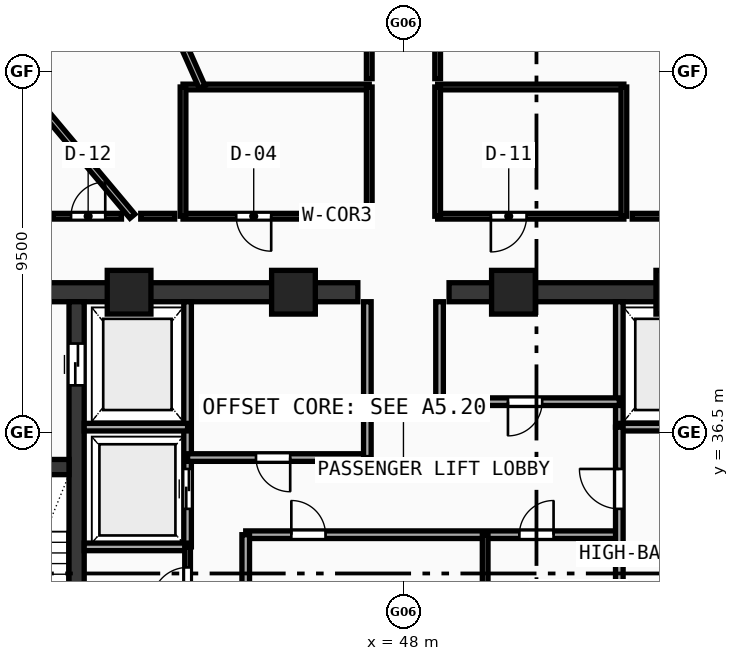
"""IFC4 building model, lengths in metres.
Left out: names, types, materials, properties, quantities, classifications, styles, units other than length and angle.
Written with IfcOpenShell. Run it as: python <this file> out.ifc"""

import sys

from ifc_helpers import new_model, si_unit, direction, frame, frame_2d, origin, origin_with_axes, origin_2d, place, context, subcontext, project, spatial, rectangle, hollow_rectangle, extrude, source, transform, mapped, element, fill, save


model = new_model("IFC4")
c1 = context("Model", 3, precision=1e-05, world=origin(), true_north=direction((0.0, 1.0)))
c2 = subcontext(c1, "Body", "Model", "MODEL_VIEW")
j1 = project(units=[si_unit("LENGTHUNIT", "METRE"), si_unit("PLANEANGLEUNIT", "RADIAN")], contexts=[c1])
p1 = place(None, origin())
s1 = spatial("IfcSite", under=j1, at=p1, CompositionType="ELEMENT")
p2 = place(p1, origin())
s2 = spatial("IfcBuilding", under=s1, at=p2, CompositionType="ELEMENT")
p3 = place(p2, frame((0.0, 0.0, 325.51)))
s3 = spatial("IfcBuildingStorey", under=s2, at=p3, CompositionType="ELEMENT", Elevation=325.51)
p4 = place(p3, frame((35.55, 40.2, 0.0), z_axis=(0.0, 0.0, 1.0), x_axis=(1.0, 0.0, 0.0)))
e1 = element("IfcWall", 1, at=p4, inside=s3, PredefinedType="SHEAR", context=c2, shape_type="SweptSolid", body=[
    extrude(rectangle(XDim=11.25, YDim=0.5, at=frame_2d((5.625, 0.0))), origin(), (0.0, 0.0, 1.0), 3.49),
])
p5 = place(p4, frame((1.6, 0.0, 0.0)))
e2 = element("IfcOpeningElement", 2, at=p5, cuts=e1, PredefinedType="OPENING", context=c2, shape_type="SweptSolid", body=[
    extrude(rectangle(XDim=1.05, YDim=2.1, at=frame_2d((0.525, 1.05))), frame((0.0, 0.26, 0.0), z_axis=(0.0, -1.0, 0.0), x_axis=(1.0, 0.0, 0.0)), (0.0, 0.0, 1.0), 0.52),
])
p6 = place(p3, frame((49.2, 40.2, 0.0), z_axis=(0.0, 0.0, 1.0), x_axis=(1.0, 0.0, 0.0)))
e3 = element("IfcWall", 3, at=p6, inside=s3, PredefinedType="SHEAR", context=c2, shape_type="SweptSolid", body=[
    extrude(rectangle(XDim=11.25, YDim=0.5, at=frame_2d((5.625, 0.0))), origin(), (0.0, 0.0, 1.0), 3.49),
])
p7 = place(p6, frame((8.6, 0.0, 0.0)))
e4 = element("IfcOpeningElement", 4, at=p7, cuts=e3, PredefinedType="OPENING", context=c2, shape_type="SweptSolid", body=[
    extrude(rectangle(XDim=1.05, YDim=2.1, at=frame_2d((0.525, 1.05))), frame((0.0, 0.26, 0.0), z_axis=(0.0, -1.0, 0.0), x_axis=(1.0, 0.0, 0.0)), (0.0, 0.0, 1.0), 0.52),
])
p8 = place(p3, frame((39.4, 27.75, 0.0), z_axis=(0.0, 0.0, 1.0), x_axis=(0.0, 1.0, 0.0)))
e5 = element("IfcWall", 5, at=p8, inside=s3, PredefinedType="SHEAR", context=c2, shape_type="SweptSolid", body=[
    extrude(rectangle(XDim=12.2, YDim=0.4, at=frame_2d((6.1, 0.0))), origin(), (0.0, 0.0, 1.0), 3.49),
])
p9 = place(p8, frame((10.0, 0.0, 0.0)))
e6 = element("IfcOpeningElement", 6, at=p9, cuts=e5, PredefinedType="OPENING", context=c2, shape_type="SweptSolid", body=[
    extrude(rectangle(XDim=1.1, YDim=2.1, at=frame_2d((0.55, 1.05))), frame((0.0, 0.21, 0.0), z_axis=(0.0, -1.0, 0.0), x_axis=(1.0, 0.0, 0.0)), (0.0, 0.0, 1.0), 0.42),
])
p10 = place(p3, frame((36.05, 35.6, 0.0), z_axis=(0.0, 0.0, 1.0), x_axis=(1.0, 0.0, 0.0)))
e7 = element("IfcWall", 7, at=p10, inside=s3, PredefinedType="SHEAR", context=c2, shape_type="SweptSolid", body=[
    extrude(rectangle(XDim=3.15, YDim=0.4, at=frame_2d((1.575, 0.0))), origin(), (0.0, 0.0, 1.0), 3.49),
])
p11 = place(p10, frame((1.07, 0.0, 0.0)))
e8 = element("IfcOpeningElement", 8, at=p11, cuts=e7, PredefinedType="OPENING", context=c2, shape_type="SweptSolid", body=[
    extrude(rectangle(XDim=1.05, YDim=2.1, at=frame_2d((0.525, 1.05))), frame((0.0, 0.21, 0.0), z_axis=(0.0, -1.0, 0.0), x_axis=(1.0, 0.0, 0.0)), (0.0, 0.0, 1.0), 0.42),
])
m1 = source(origin(), c2, "Body", "SweptSolid", [
    extrude(hollow_rectangle(XDim=1.15, YDim=1.15, WallThickness=0.048, at=origin_2d()), origin(), (0.0, 0.0, 1.0), 3.75),
])
for number, where, z_axis, x_axis in (
    (9, (55.219, 40.2, -0.26), (0.0, 0.0, 1.0), (1.0, 0.0, 0.0)),
    (10, (50.894, 40.2, -0.26), (0.0, 0.0, 1.0), (1.0, 0.0, 0.0)),
    (11, (45.106, 40.2, -0.26), (0.0, 0.0, 1.0), (1.0, 0.0, 0.0)),
    (12, (40.781, 40.2, -0.26), (0.0, 0.0, 1.0), (1.0, 0.0, 0.0)),
):
    element("IfcColumn", number, at=place(p3, frame(where, z_axis=z_axis, x_axis=x_axis)), inside=s3, PredefinedType="COLUMN", context=c2, shape_type="MappedRepresentation", body=[
        mapped(m1, transform((0.0, 0.0, 0.0), scale=1.0)),
    ])
p12 = place(p3, frame((42.32, 33.5, 0.0), z_axis=(0.0, 0.0, 1.0), x_axis=(0.0, 1.0, 0.0)))
e13 = element("IfcWall", 13, at=p12, inside=s3, PredefinedType="SOLIDWALL", context=c2, shape_type="SweptSolid", body=[
    extrude(rectangle(XDim=6.45, YDim=0.2, at=frame_2d((3.225, 0.0))), origin(), (0.0, 0.0, 1.0), 3.49),
])
p13 = place(p12, frame((1.0, 0.0, 0.0)))
e14 = element("IfcOpeningElement", 14, at=p13, cuts=e13, PredefinedType="OPENING", context=c2, shape_type="SweptSolid", body=[
    extrude(rectangle(XDim=1.05, YDim=2.1, at=frame_2d((0.525, 1.05))), frame((0.0, 0.11, 0.0), z_axis=(0.0, -1.0, 0.0), x_axis=(1.0, 0.0, 0.0)), (0.0, 0.0, 1.0), 0.22),
])
for number, where, z_axis, x_axis in (
    (15, (39.6, 36.65, 0.0), (0.0, 0.0, 1.0), (1.0, 0.0, 0.0)),
    (16, (39.6, 33.5, 0.0), (0.0, 0.0, 1.0), (1.0, 0.0, 0.0)),
):
    element("IfcWall", number, at=place(p3, frame(where, z_axis=z_axis, x_axis=x_axis)), inside=s3, PredefinedType="SOLIDWALL", context=c2, shape_type="SweptSolid", body=[
        extrude(rectangle(XDim=2.72, YDim=0.2, at=frame_2d((1.36, 0.0))), origin(), (0.0, 0.0, 1.0), 3.49),
    ])
p14 = place(p3, frame((53.68, 36.65, 0.0), z_axis=(0.0, 0.0, 1.0), x_axis=(0.0, 1.0, 0.0)))
e17 = element("IfcWall", 17, at=p14, inside=s3, PredefinedType="SOLIDWALL", context=c2, shape_type="SweptSolid", body=[
    extrude(rectangle(XDim=3.3, YDim=0.2, at=frame_2d((1.65, 0.0))), origin(), (0.0, 0.0, 1.0), 3.49),
])
p15 = place(p3, frame((53.68, 36.65, 0.0), z_axis=(0.0, 0.0, 1.0), x_axis=(1.0, 0.0, 0.0)))
e18 = element("IfcWall", 18, at=p15, inside=s3, PredefinedType="SOLIDWALL", context=c2, shape_type="SweptSolid", body=[
    extrude(rectangle(XDim=2.72, YDim=0.2, at=frame_2d((1.36, 0.0))), origin(), (0.0, 0.0, 1.0), 3.49),
])
p16 = place(p3, frame((42.32, 35.85, 0.0), z_axis=(0.0, 0.0, 1.0), x_axis=(1.0, 0.0, 0.0)))
e19 = element("IfcWall", 19, at=p16, inside=s3, PredefinedType="SOLIDWALL", context=c2, shape_type="SweptSolid", body=[
    extrude(rectangle(XDim=4.73, YDim=0.2, at=frame_2d((2.365, 0.0))), origin(), (0.0, 0.0, 1.0), 3.49),
])
p17 = place(p16, frame((1.8, 0.0, 0.0)))
e20 = element("IfcOpeningElement", 20, at=p17, cuts=e19, PredefinedType="OPENING", context=c2, shape_type="SweptSolid", body=[
    extrude(rectangle(XDim=0.9, YDim=2.1, at=frame_2d((0.45, 1.05))), frame((0.0, 0.11, 0.0), z_axis=(0.0, -1.0, 0.0), x_axis=(1.0, 0.0, 0.0)), (0.0, 0.0, 1.0), 0.22),
])
p18 = place(p3, frame((48.95, 37.32, 0.0), z_axis=(0.0, 0.0, 1.0), x_axis=(1.0, 0.0, 0.0)))
e21 = element("IfcWall", 21, at=p18, inside=s3, PredefinedType="SOLIDWALL", context=c2, shape_type="SweptSolid", body=[
    extrude(rectangle(XDim=4.73, YDim=0.2, at=frame_2d((2.365, 0.0))), origin(), (0.0, 0.0, 1.0), 3.49),
])
p19 = place(p18, frame((1.8, 0.0, 0.0)))
e22 = element("IfcOpeningElement", 22, at=p19, cuts=e21, PredefinedType="OPENING", context=c2, shape_type="SweptSolid", body=[
    extrude(rectangle(XDim=0.9, YDim=2.1, at=frame_2d((0.45, 1.05))), frame((0.0, 0.11, 0.0), z_axis=(0.0, -1.0, 0.0), x_axis=(1.0, 0.0, 0.0)), (0.0, 0.0, 1.0), 0.22),
])
p20 = place(p3, frame((47.05, 35.85, 0.0), z_axis=(0.0, 0.0, 1.0), x_axis=(0.0, 1.0, 0.0)))
e23 = element("IfcWall", 23, at=p20, inside=s3, PredefinedType="SOLIDWALL", context=c2, shape_type="SweptSolid", body=[
    extrude(rectangle(XDim=4.1, YDim=0.2, at=frame_2d((2.05, 0.0))), origin(), (0.0, 0.0, 1.0), 3.49),
])
p21 = place(p3, frame((48.95, 37.32, 0.0), z_axis=(0.0, 0.0, 1.0), x_axis=(0.0, 1.0, 0.0)))
e24 = element("IfcWall", 24, at=p21, inside=s3, PredefinedType="SOLIDWALL", context=c2, shape_type="SweptSolid", body=[
    extrude(rectangle(XDim=2.63, YDim=0.2, at=frame_2d((1.315, 0.0))), origin(), (0.0, 0.0, 1.0), 3.49),
])
p22 = place(p3, frame((43.85, 33.82, 0.0), z_axis=(0.0, 0.0, 1.0), x_axis=(1.0, 0.0, 0.0)))
e25 = element("IfcWall", 25, at=p22, inside=s3, PredefinedType="SOLIDWALL", context=c2, shape_type="SweptSolid", body=[
    extrude(rectangle(XDim=9.83, YDim=0.2, at=frame_2d((4.915, 0.0))), origin(), (0.0, 0.0, 1.0), 3.49),
])
p23 = place(p22, frame((1.2, 0.0, 0.0)))
e26 = element("IfcOpeningElement", 26, at=p23, cuts=e25, PredefinedType="OPENING", context=c2, shape_type="SweptSolid", body=[
    extrude(rectangle(XDim=0.9, YDim=2.1, at=frame_2d((0.45, 1.05))), frame((0.0, 0.11, 0.0), z_axis=(0.0, -1.0, 0.0), x_axis=(1.0, 0.0, 0.0)), (0.0, 0.0, 1.0), 0.22),
])
p24 = place(p22, frame((7.2, 0.0, 0.0)))
e27 = element("IfcOpeningElement", 27, at=p24, cuts=e25, PredefinedType="OPENING", context=c2, shape_type="SweptSolid", body=[
    extrude(rectangle(XDim=0.9, YDim=2.1, at=frame_2d((0.45, 1.05))), frame((0.0, 0.11, 0.0), z_axis=(0.0, -1.0, 0.0), x_axis=(1.0, 0.0, 0.0)), (0.0, 0.0, 1.0), 0.22),
])
p25 = place(p3, frame((43.85, 27.6, 0.0), z_axis=(0.0, 0.0, 1.0), x_axis=(0.0, 1.0, 0.0)))
e28 = element("IfcWall", 28, at=p25, inside=s3, PredefinedType="SOLIDWALL", context=c2, shape_type="SweptSolid", body=[
    extrude(rectangle(XDim=6.22, YDim=0.2, at=frame_2d((3.11, 0.0))), origin(), (0.0, 0.0, 1.0), 3.49),
])
p26 = place(p25, frame((2.25, 0.0, 0.0)))
e29 = element("IfcOpeningElement", 29, at=p26, cuts=e28, PredefinedType="OPENING", context=c2, shape_type="SweptSolid", body=[
    extrude(rectangle(XDim=1.05, YDim=2.1, at=frame_2d((0.525, 1.05))), frame((0.0, 0.11, 0.0), z_axis=(0.0, -1.0, 0.0), x_axis=(1.0, 0.0, 0.0)), (0.0, 0.0, 1.0), 0.22),
])
p27 = place(p3, frame((53.68, 27.6, 0.0), z_axis=(0.0, 0.0, 1.0), x_axis=(0.0, 1.0, 0.0)))
e30 = element("IfcWall", 30, at=p27, inside=s3, PredefinedType="SOLIDWALL", context=c2, shape_type="SweptSolid", body=[
    extrude(rectangle(XDim=9.05, YDim=0.2, at=frame_2d((4.525, 0.0))), origin(), (0.0, 0.0, 1.0), 3.49),
])
p28 = place(p27, frame((6.9, 0.0, 0.0)))
e31 = element("IfcOpeningElement", 31, at=p28, cuts=e30, PredefinedType="OPENING", context=c2, shape_type="SweptSolid", body=[
    extrude(rectangle(XDim=1.05, YDim=2.1, at=frame_2d((0.525, 1.05))), frame((0.0, 0.11, 0.0), z_axis=(0.0, -1.0, 0.0), x_axis=(1.0, 0.0, 0.0)), (0.0, 0.0, 1.0), 0.22),
])
p29 = place(p3, frame((50.15, 31.12, 0.0), z_axis=(0.0, 0.0, 1.0), x_axis=(0.0, 1.0, 0.0)))
e32 = element("IfcWall", 32, at=p29, inside=s3, PredefinedType="PARTITIONING", context=c2, shape_type="SweptSolid", body=[
    extrude(rectangle(XDim=2.7, YDim=0.15, at=frame_2d((1.35, 0.0))), origin(), (0.0, 0.0, 1.0), 3.49),
])
p30 = place(p3, frame((42.32, 27.6, 0.0), z_axis=(0.0, 0.0, 1.0), x_axis=(0.0, 1.0, 0.0)))
e33 = element("IfcWall", 33, at=p30, inside=s3, PredefinedType="PARTITIONING", context=c2, shape_type="SweptSolid", body=[
    extrude(rectangle(XDim=5.9, YDim=0.15, at=frame_2d((2.95, 0.0))), origin(), (0.0, 0.0, 1.0), 3.49),
])
p31 = place(p30, frame((0.5, 0.0, 0.0)))
e34 = element("IfcOpeningElement", 34, at=p31, cuts=e33, PredefinedType="OPENING", context=c2, shape_type="SweptSolid", body=[
    extrude(rectangle(XDim=0.9, YDim=2.1, at=frame_2d((0.45, 1.05))), frame((0.0, 0.085, 0.0), z_axis=(0.0, -1.0, 0.0), x_axis=(1.0, 0.0, 0.0)), (0.0, 0.0, 1.0), 0.17),
])
p32 = place(p30, frame((2.45, 0.0, 0.0)))
e35 = element("IfcOpeningElement", 35, at=p32, cuts=e33, PredefinedType="OPENING", context=c2, shape_type="SweptSolid", body=[
    extrude(rectangle(XDim=0.9, YDim=2.1, at=frame_2d((0.45, 1.05))), frame((0.0, 0.085, 0.0), z_axis=(0.0, -1.0, 0.0), x_axis=(1.0, 0.0, 0.0)), (0.0, 0.0, 1.0), 0.17),
])
p33 = place(p30, frame((4.42, 0.0, 0.0)))
e36 = element("IfcOpeningElement", 36, at=p33, cuts=e33, PredefinedType="OPENING", context=c2, shape_type="SweptSolid", body=[
    extrude(rectangle(XDim=0.94, YDim=2.1, at=frame_2d((0.47, 1.05))), frame((0.0, 0.085, 0.0), z_axis=(0.0, -1.0, 0.0), x_axis=(1.0, 0.0, 0.0)), (0.0, 0.0, 1.0), 0.17),
])
p34 = place(p3, frame((42.2, 42.2, 0.0), z_axis=(0.0, 0.0, 1.0), x_axis=(1.0, 0.0, 0.0)))
e37 = element("IfcWall", 37, at=p34, inside=s3, PredefinedType="PARTITIONING", context=c2, shape_type="SweptSolid", body=[
    extrude(rectangle(XDim=4.9, YDim=0.15, at=frame_2d((2.45, 0.0))), origin(), (0.0, 0.0, 1.0), 2.89),
])
p35 = place(p34, frame((1.4, 0.0, 0.0)))
e38 = element("IfcOpeningElement", 38, at=p35, cuts=e37, PredefinedType="OPENING", context=c2, shape_type="SweptSolid", body=[
    extrude(rectangle(XDim=0.92, YDim=2.1, at=frame_2d((0.46, 1.05))), frame((0.0, 0.085, 0.0), z_axis=(0.0, -1.0, 0.0), x_axis=(1.0, 0.0, 0.0)), (0.0, 0.0, 1.0), 0.17),
])
p36 = place(p3, frame((42.2, 45.6, 0.0), z_axis=(0.0, 0.0, 1.0), x_axis=(1.0, 0.0, 0.0)))
e39 = element("IfcWall", 39, at=p36, inside=s3, PredefinedType="PARTITIONING", context=c2, shape_type="SweptSolid", body=[
    extrude(rectangle(XDim=4.9, YDim=0.15, at=frame_2d((2.45, 0.0))), origin(), (0.0, 0.0, 1.0), 2.89),
])
for number, where, z_axis, x_axis in (
    (40, (42.2, 42.2, 0.0), (0.0, 0.0, 1.0), (0.0, 1.0, 0.0)),
    (41, (47.1, 42.2, 0.0), (0.0, 0.0, 1.0), (0.0, 1.0, 0.0)),
):
    element("IfcWall", number, at=place(p3, frame(where, z_axis=z_axis, x_axis=x_axis)), inside=s3, PredefinedType="PARTITIONING", context=c2, shape_type="SweptSolid", body=[
        extrude(rectangle(XDim=3.4, YDim=0.15, at=frame_2d((1.7, 0.0))), origin(), (0.0, 0.0, 1.0), 3.49),
    ])
p37 = place(p3, frame((48.9, 42.2, 0.0), z_axis=(0.0, 0.0, 1.0), x_axis=(1.0, 0.0, 0.0)))
e42 = element("IfcWall", 42, at=p37, inside=s3, PredefinedType="PARTITIONING", context=c2, shape_type="SweptSolid", body=[
    extrude(rectangle(XDim=4.9, YDim=0.15, at=frame_2d((2.45, 0.0))), origin(), (0.0, 0.0, 1.0), 2.89),
])
p38 = place(p37, frame((1.4, 0.0, 0.0)))
e43 = element("IfcOpeningElement", 43, at=p38, cuts=e42, PredefinedType="OPENING", context=c2, shape_type="SweptSolid", body=[
    extrude(rectangle(XDim=0.94, YDim=2.1, at=frame_2d((0.47, 1.05))), frame((0.0, 0.085, 0.0), z_axis=(0.0, -1.0, 0.0), x_axis=(1.0, 0.0, 0.0)), (0.0, 0.0, 1.0), 0.17),
])
p39 = place(p3, frame((48.9, 45.6, 0.0), z_axis=(0.0, 0.0, 1.0), x_axis=(1.0, 0.0, 0.0)))
e44 = element("IfcWall", 44, at=p39, inside=s3, PredefinedType="PARTITIONING", context=c2, shape_type="SweptSolid", body=[
    extrude(rectangle(XDim=4.9, YDim=0.15, at=frame_2d((2.45, 0.0))), origin(), (0.0, 0.0, 1.0), 2.89),
])
for number, where, z_axis, x_axis in (
    (45, (48.9, 42.2, 0.0), (0.0, 0.0, 1.0), (0.0, 1.0, 0.0)),
    (46, (53.8, 42.2, 0.0), (0.0, 0.0, 1.0), (0.0, 1.0, 0.0)),
):
    element("IfcWall", number, at=place(p3, frame(where, z_axis=z_axis, x_axis=x_axis)), inside=s3, PredefinedType="PARTITIONING", context=c2, shape_type="SweptSolid", body=[
        extrude(rectangle(XDim=3.4, YDim=0.15, at=frame_2d((1.7, 0.0))), origin(), (0.0, 0.0, 1.0), 3.49),
    ])
p40 = place(p3, frame((42.702, 45.6, 0.0), z_axis=(0.0, 0.0, 1.0), x_axis=(-0.406746839759, 0.913540917719, 0.0)))
e47 = element("IfcWall", 47, at=p40, inside=s3, PredefinedType="PARTITIONING", context=c2, shape_type="SweptSolid", body=[
    extrude(rectangle(XDim=17.013, YDim=0.17, at=frame_2d((8.507, 0.0))), origin(), (0.0, 0.0, 1.0), 2.89),
])
p41 = place(p3, frame((40.868, 42.2, 0.0), z_axis=(0.0, 0.0, 1.0), x_axis=(-0.642782037032, 0.766049119096, 0.0)))
e48 = element("IfcWall", 48, at=p41, inside=s3, PredefinedType="PARTITIONING", context=c2, shape_type="SweptSolid", body=[
    extrude(rectangle(XDim=15.14, YDim=0.17, at=frame_2d((7.57, 0.0))), origin(), (0.0, 0.0, 1.0), 2.89),
])
p42 = place(p3, frame((38.78, 42.2, 0.0), z_axis=(0.0, 0.0, 1.0), x_axis=(1.0, 0.0, 0.0)))
e49 = element("IfcWall", 49, at=p42, inside=s3, PredefinedType="PARTITIONING", context=c2, shape_type="SweptSolid", body=[
    extrude(rectangle(XDim=1.801, YDim=0.15, at=frame_2d((0.9, 0.0))), origin(), (0.0, 0.0, 1.0), 2.89),
])
p43 = place(p42, frame((0.474, 0.0, 0.0)))
e50 = element("IfcOpeningElement", 50, at=p43, cuts=e49, PredefinedType="OPENING", context=c2, shape_type="SweptSolid", body=[
    extrude(rectangle(XDim=0.9, YDim=2.08, at=frame_2d((0.45, 1.04))), frame((0.0, 0.085, 0.0), z_axis=(0.0, -1.0, 0.0), x_axis=(1.0, 0.0, 0.0)), (0.0, 0.0, 1.0), 0.17),
])
p44 = place(p3, frame((41.088, 42.2, 0.0), z_axis=(0.0, 0.0, 1.0), x_axis=(1.0, 0.0, 0.0)))
e51 = element("IfcWall", 51, at=p44, inside=s3, PredefinedType="PARTITIONING", context=c2, shape_type="SweptSolid", body=[
    extrude(rectangle(XDim=0.892, YDim=0.15, at=frame_2d((0.446, 0.0))), origin(), (0.0, 0.0, 1.0), 3.49),
])
p45 = place(p3, frame((47.1, 45.82, 0.0), z_axis=(0.0, 0.0, 1.0), x_axis=(0.0, 1.0, 0.0)))
e52 = element("IfcWall", 52, at=p45, inside=s3, PredefinedType="PARTITIONING", context=c2, shape_type="SweptSolid", body=[
    extrude(rectangle(XDim=3.68, YDim=0.15, at=frame_2d((1.84, 0.0))), origin(), (0.0, 0.0, 1.0), 3.14),
])
p46 = place(p45, frame((1.485, 0.0, 0.0)))
e53 = element("IfcOpeningElement", 53, at=p46, cuts=e52, PredefinedType="OPENING", context=c2, shape_type="SweptSolid", body=[
    extrude(rectangle(XDim=0.98, YDim=2.12, at=frame_2d((0.49, 1.06))), frame((0.0, 0.085, 0.0), z_axis=(0.0, -1.0, 0.0), x_axis=(1.0, 0.0, 0.0)), (0.0, 0.0, 1.0), 0.17),
])
p47 = place(p3, frame((48.9, 49.5, 0.0), z_axis=(0.0, 0.0, 1.0), x_axis=(0.0, -1.0, 0.0)))
e54 = element("IfcWall", 54, at=p47, inside=s3, PredefinedType="PARTITIONING", context=c2, shape_type="SweptSolid", body=[
    extrude(rectangle(XDim=3.68, YDim=0.15, at=frame_2d((1.84, 0.0))), origin(), (0.0, 0.0, 1.0), 3.14),
])
p48 = place(p3, frame((54.02, 42.2, 0.0), z_axis=(0.0, 0.0, 1.0), x_axis=(1.0, 0.0, 0.0)))
e55 = element("IfcWall", 55, at=p48, inside=s3, PredefinedType="PARTITIONING", context=c2, shape_type="SweptSolid", body=[
    extrude(rectangle(XDim=3.2, YDim=0.15, at=frame_2d((1.6, 0.0))), origin(), (0.0, 0.0, 1.0), 2.89),
])
m2 = source(origin(), c2, "Body", "SweptSolid", [
    extrude(rectangle(XDim=1.1, YDim=2.1, at=frame_2d((0.55, 1.05))), frame((0.0, 0.025, 0.0), z_axis=(0.0, -1.0, 0.0), x_axis=(1.0, 0.0, 0.0)), (0.0, 0.0, 1.0), 0.05),
])
p49 = place(p9, frame((1.1, 0.0, 0.0), z_axis=(0.0, 0.0, 1.0), x_axis=(-1.0, 0.0, 0.0)))
e56 = element("IfcDoor", 56, at=p49, inside=s3, OperationType="DOUBLE_DOOR_SLIDING", PredefinedType="DOOR", context=c2, shape_type="MappedRepresentation", body=[
    mapped(m2, transform((0.0, 0.0, 0.0), scale=1.0)),
])
fill(e6, e56)
m3 = source(origin(), c2, "Body", "SweptSolid", [
    extrude(rectangle(XDim=1.05, YDim=2.1, at=frame_2d((0.525, 1.05))), frame((0.0, 0.025, 0.0), z_axis=(0.0, -1.0, 0.0), x_axis=(1.0, 0.0, 0.0)), (0.0, 0.0, 1.0), 0.05),
])
p50 = place(p13, origin_with_axes())
e57 = element("IfcDoor", 57, at=p50, inside=s3, OperationType="DOUBLE_DOOR_SLIDING", PredefinedType="DOOR", context=c2, shape_type="MappedRepresentation", body=[
    mapped(m3, transform((0.0, 0.0, 0.0), scale=1.0)),
])
fill(e14, e57)
m4 = source(origin(), c2, "Body", "SweptSolid", [
    extrude(rectangle(XDim=0.9, YDim=2.1, at=frame_2d((0.45, 1.05))), frame((0.0, 0.025, 0.0), z_axis=(0.0, -1.0, 0.0), x_axis=(1.0, 0.0, 0.0)), (0.0, 0.0, 1.0), 0.05),
])
p51 = place(p17, frame((0.9, 0.0, 0.0), z_axis=(0.0, 0.0, 1.0), x_axis=(-1.0, 0.0, 0.0)))
e58 = element("IfcDoor", 58, at=p51, inside=s3, OperationType="SINGLE_SWING_LEFT", PredefinedType="DOOR", context=c2, shape_type="MappedRepresentation", body=[
    mapped(m4, transform((0.0, 0.0, 0.0), scale=1.0)),
])
fill(e20, e58)
p52 = place(p19, frame((0.9, 0.0, 0.0), z_axis=(0.0, 0.0, 1.0), x_axis=(-1.0, 0.0, 0.0)))
e59 = element("IfcDoor", 59, at=p52, inside=s3, OperationType="SINGLE_SWING_RIGHT", PredefinedType="DOOR", context=c2, shape_type="MappedRepresentation", body=[
    mapped(m4, transform((0.0, 0.0, 0.0), scale=1.0)),
])
fill(e22, e59)
p53 = place(p23, origin_with_axes())
e60 = element("IfcDoor", 60, at=p53, inside=s3, OperationType="SINGLE_SWING_LEFT", PredefinedType="DOOR", context=c2, shape_type="MappedRepresentation", body=[
    mapped(m4, transform((0.0, 0.0, 0.0), scale=1.0)),
])
fill(e26, e60)
p54 = place(p24, origin_with_axes())
e61 = element("IfcDoor", 61, at=p54, inside=s3, OperationType="SINGLE_SWING_RIGHT", PredefinedType="DOOR", context=c2, shape_type="MappedRepresentation", body=[
    mapped(m4, transform((0.0, 0.0, 0.0), scale=1.0)),
])
fill(e27, e61)
p55 = place(p28, origin_with_axes())
e62 = element("IfcDoor", 62, at=p55, inside=s3, OperationType="SINGLE_SWING_RIGHT", PredefinedType="DOOR", context=c2, shape_type="MappedRepresentation", body=[
    mapped(m3, transform((0.0, 0.0, 0.0), scale=1.0)),
])
fill(e31, e62)
m5 = source(origin(), c2, "Body", "SweptSolid", [
    extrude(rectangle(XDim=0.94, YDim=2.1, at=frame_2d((0.47, 1.05))), frame((0.0, 0.025, 0.0), z_axis=(0.0, -1.0, 0.0), x_axis=(1.0, 0.0, 0.0)), (0.0, 0.0, 1.0), 0.05),
])
p56 = place(p33, origin_with_axes())
e63 = element("IfcDoor", 63, at=p56, inside=s3, OperationType="SINGLE_SWING_LEFT", PredefinedType="DOOR", context=c2, shape_type="MappedRepresentation", body=[
    mapped(m5, transform((0.0, 0.0, 0.0), scale=1.0)),
])
fill(e36, e63)
m6 = source(origin(), c2, "Body", "SweptSolid", [
    extrude(rectangle(XDim=0.92, YDim=2.1, at=frame_2d((0.46, 1.05))), frame((0.0, 0.025, 0.0), z_axis=(0.0, -1.0, 0.0), x_axis=(1.0, 0.0, 0.0)), (0.0, 0.0, 1.0), 0.05),
])
p57 = place(p35, frame((0.92, 0.0, 0.0), z_axis=(0.0, 0.0, 1.0), x_axis=(-1.0, 0.0, 0.0)))
e64 = element("IfcDoor", 64, at=p57, inside=s3, OperationType="SINGLE_SWING_LEFT", PredefinedType="DOOR", context=c2, shape_type="MappedRepresentation", body=[
    mapped(m6, transform((0.0, 0.0, 0.0), scale=1.0)),
])
fill(e38, e64)
p58 = place(p38, frame((0.94, 0.0, 0.0), z_axis=(0.0, 0.0, 1.0), x_axis=(-1.0, 0.0, 0.0)))
e65 = element("IfcDoor", 65, at=p58, inside=s3, OperationType="SINGLE_SWING_RIGHT", PredefinedType="DOOR", context=c2, shape_type="MappedRepresentation", body=[
    mapped(m5, transform((0.0, 0.0, 0.0), scale=1.0)),
])
fill(e43, e65)
m7 = source(origin(), c2, "Body", "SweptSolid", [
    extrude(rectangle(XDim=0.9, YDim=2.08, at=frame_2d((0.45, 1.04))), frame((0.0, 0.025, 0.0), z_axis=(0.0, -1.0, 0.0), x_axis=(1.0, 0.0, 0.0)), (0.0, 0.0, 1.0), 0.05),
])
p59 = place(p43, origin_with_axes())
e66 = element("IfcDoor", 66, at=p59, inside=s3, OperationType="SINGLE_SWING_RIGHT", PredefinedType="DOOR", context=c2, shape_type="MappedRepresentation", body=[
    mapped(m7, transform((0.0, 0.0, 0.0), scale=1.0)),
])
fill(e50, e66)
save(model, sys.argv[1])
